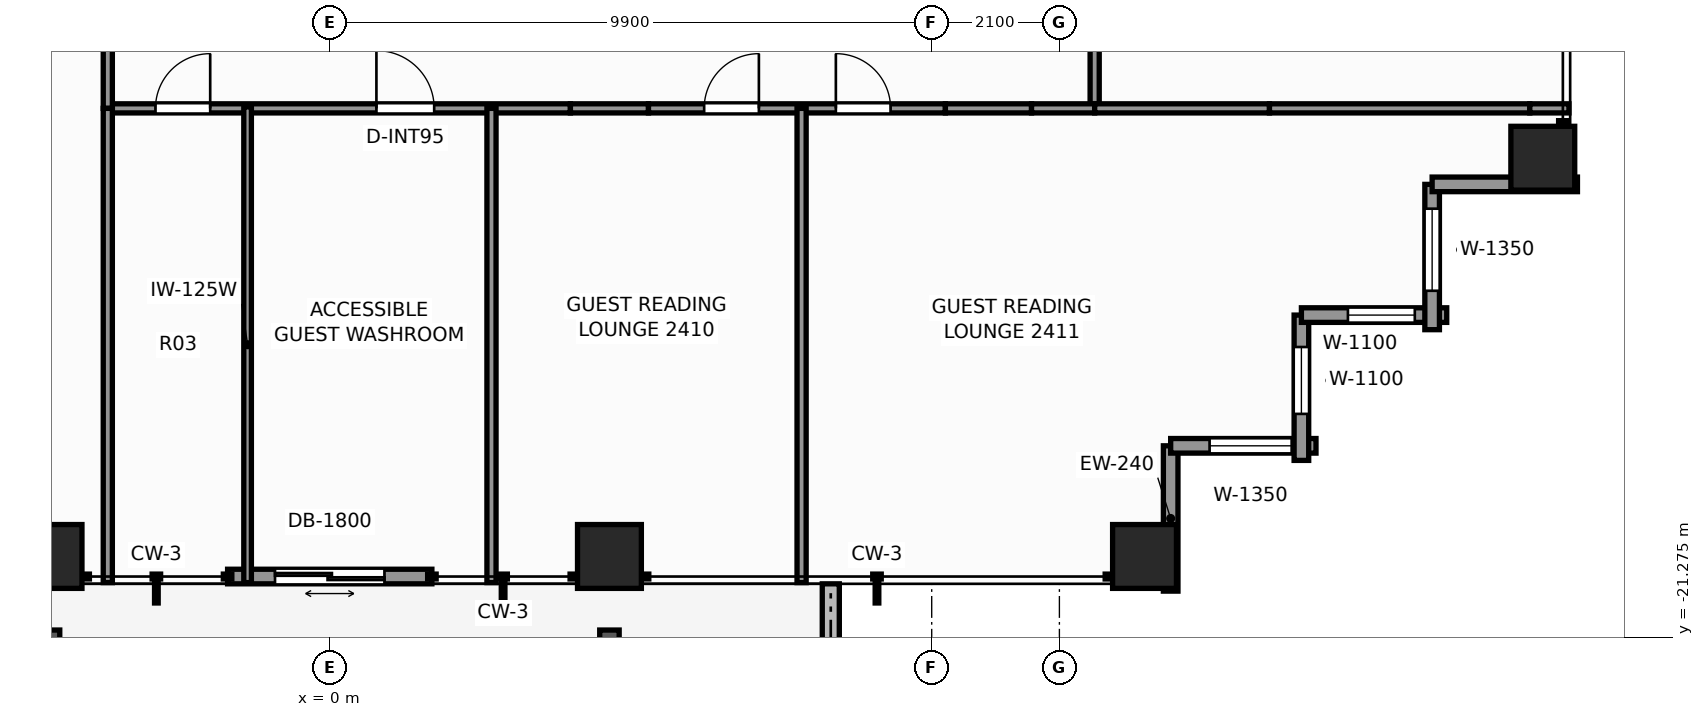
"""IFC4 building model, lengths in metres.
Left out: names, types, materials, properties, quantities, classifications, styles, units other than length and angle.
Written with IfcOpenShell. Run it as: python <this file> out.ifc"""

import sys

from ifc_helpers import new_model, si_unit, direction, frame, frame_2d, origin, origin_2d, place, context, subcontext, project, spatial, rectangle, extrude, element, fill, save


model = new_model("IFC4")
c1 = context("Model", 3, precision=1e-05, world=origin(), true_north=direction((0.0, 1.0)))
c2 = subcontext(c1, "Body", "Model", "MODEL_VIEW")
j1 = project(units=[si_unit("LENGTHUNIT", "METRE"), si_unit("PLANEANGLEUNIT", "RADIAN")], contexts=[c1])
p1 = place(None, origin())
s1 = spatial("IfcSite", under=j1, at=p1, CompositionType="ELEMENT")
p2 = place(p1, origin())
s2 = spatial("IfcBuilding", under=s1, at=p2, CompositionType="ELEMENT")
p3 = place(p2, frame((0.0, 0.0, 85.4)))
s3 = spatial("IfcBuildingStorey", under=s2, at=p3, CompositionType="ELEMENT", Elevation=85.4)
for number, where, z_axis, x_axis in (
    (1, (-4.6, -19.95, 0.0), (0.0, 0.0, 1.0), (1.0, 0.0, 0.0)),
    (2, (4.6, -19.95, 0.0), (0.0, 0.0, 1.0), (1.0, 0.0, 0.0)),
    (3, (13.4, -19.95, 0.0), (0.0, 0.0, 1.0), (1.0, 0.0, 0.0)),
    (4, (19.95, -13.4, 0.0), (0.0, 0.0, 1.0), (1.0, 0.0, 0.0)),
):
    element("IfcColumn", number, at=place(p3, frame(where, z_axis=z_axis, x_axis=x_axis)), inside=s3, PredefinedType="COLUMN", context=c2, shape_type="SweptSolid", body=[
        extrude(rectangle(XDim=1.05, YDim=1.05, at=origin_2d()), origin(), (0.0, 0.0, 1.0), 3.3),
    ])
p4 = place(p3, frame((8.24, -21.866, -0.04), z_axis=(0.0, 0.0, 1.0), x_axis=(0.0, 1.0, 0.0)))
e5 = element("IfcWall", 5, at=p4, inside=s3, PredefinedType="PARAPET", context=c2, shape_type="SweptSolid", body=[
    extrude(rectangle(XDim=1.466, YDim=0.28, at=frame_2d((0.733, 0.0))), origin(), (0.0, 0.0, 1.0), 0.42),
])
p5 = place(p3, frame((1.68, -20.28, 0.0), z_axis=(0.0, 0.0, 1.0), x_axis=(-1.0, 0.0, 0.0)))
e6 = element("IfcWall", 6, at=p5, inside=s3, PredefinedType="STANDARD", context=c2, shape_type="SweptSolid", body=[
    extrude(rectangle(XDim=3.36, YDim=0.24, at=frame_2d((1.68, 0.0))), origin(), (0.0, 0.0, 1.0), 3.08),
])
p6 = place(p5, frame((0.78, 0.0, 0.0)))
e7 = element("IfcOpeningElement", 7, at=p6, cuts=e6, PredefinedType="OPENING", context=c2, shape_type="SweptSolid", body=[
    extrude(rectangle(XDim=1.8, YDim=2.2, at=frame_2d((0.9, 1.1))), frame((0.0, 0.13, 0.0), z_axis=(0.0, -1.0, 0.0), x_axis=(1.0, 0.0, 0.0)), (0.0, 0.0, 1.0), 0.26),
])
p7 = place(p3, frame((13.83, -18.13, 0.0), z_axis=(0.0, 0.0, 1.0), x_axis=(0.0, -1.0, 0.0)))
e8 = element("IfcWall", 8, at=p7, inside=s3, PredefinedType="STANDARD", context=c2, shape_type="SweptSolid", body=[
    extrude(rectangle(XDim=2.39, YDim=0.24, at=frame_2d((1.195, 0.0))), origin(), (0.0, 0.0, 1.0), 1.275),
])
p8 = place(p3, frame((16.22, -18.13, 0.0), z_axis=(0.0, 0.0, 1.0), x_axis=(-1.0, 0.0, 0.0)))
e9 = element("IfcWall", 9, at=p8, inside=s3, PredefinedType="STANDARD", context=c2, shape_type="SweptSolid", body=[
    extrude(rectangle(XDim=2.39, YDim=0.24, at=frame_2d((1.195, 0.0))), origin(), (0.0, 0.0, 1.0), 2.459),
])
p9 = place(p8, frame((0.4, 0.0, 0.65)))
e10 = element("IfcOpeningElement", 10, at=p9, cuts=e9, PredefinedType="OPENING", context=c2, shape_type="SweptSolid", body=[
    extrude(rectangle(XDim=1.35, YDim=1.55, at=frame_2d((0.675, 0.775))), frame((0.0, 0.13, 0.0), z_axis=(0.0, -1.0, 0.0), x_axis=(1.0, 0.0, 0.0)), (0.0, 0.0, 1.0), 0.26),
])
p10 = place(p3, frame((15.98, -15.98, 0.0), z_axis=(0.0, 0.0, 1.0), x_axis=(0.0, -1.0, 0.0)))
e11 = element("IfcWall", 11, at=p10, inside=s3, PredefinedType="STANDARD", context=c2, shape_type="SweptSolid", body=[
    extrude(rectangle(XDim=2.39, YDim=0.24, at=frame_2d((1.195, 0.0))), origin(), (0.0, 0.0, 1.0), 2.459),
])
p11 = place(p10, frame((0.525, 0.0, 0.65)))
e12 = element("IfcOpeningElement", 12, at=p11, cuts=e11, PredefinedType="OPENING", context=c2, shape_type="SweptSolid", body=[
    extrude(rectangle(XDim=1.1, YDim=1.45, at=frame_2d((0.55, 0.725))), frame((0.0, 0.13, 0.0), z_axis=(0.0, -1.0, 0.0), x_axis=(1.0, 0.0, 0.0)), (0.0, 0.0, 1.0), 0.26),
])
p12 = place(p3, frame((18.37, -15.98, 0.0), z_axis=(0.0, 0.0, 1.0), x_axis=(-1.0, 0.0, 0.0)))
e13 = element("IfcWall", 13, at=p12, inside=s3, PredefinedType="STANDARD", context=c2, shape_type="SweptSolid", body=[
    extrude(rectangle(XDim=2.39, YDim=0.24, at=frame_2d((1.195, 0.0))), origin(), (0.0, 0.0, 1.0), 2.459),
])
p13 = place(p12, frame((0.525, 0.0, 0.65)))
e14 = element("IfcOpeningElement", 14, at=p13, cuts=e13, PredefinedType="OPENING", context=c2, shape_type="SweptSolid", body=[
    extrude(rectangle(XDim=1.1, YDim=1.45, at=frame_2d((0.55, 0.725))), frame((0.0, 0.13, 0.0), z_axis=(0.0, -1.0, 0.0), x_axis=(1.0, 0.0, 0.0)), (0.0, 0.0, 1.0), 0.26),
])
p14 = place(p3, frame((18.13, -13.83, 0.0), z_axis=(0.0, 0.0, 1.0), x_axis=(0.0, -1.0, 0.0)))
e15 = element("IfcWall", 15, at=p14, inside=s3, PredefinedType="STANDARD", context=c2, shape_type="SweptSolid", body=[
    extrude(rectangle(XDim=2.39, YDim=0.24, at=frame_2d((1.195, 0.0))), origin(), (0.0, 0.0, 1.0), 2.459),
])
p15 = place(p14, frame((0.4, 0.0, 0.65)))
e16 = element("IfcOpeningElement", 16, at=p15, cuts=e15, PredefinedType="OPENING", context=c2, shape_type="SweptSolid", body=[
    extrude(rectangle(XDim=1.35, YDim=1.55, at=frame_2d((0.675, 0.775))), frame((0.0, 0.13, 0.0), z_axis=(0.0, -1.0, 0.0), x_axis=(1.0, 0.0, 0.0)), (0.0, 0.0, 1.0), 0.26),
])
p16 = place(p3, frame((20.52, -13.83, 0.0), z_axis=(0.0, 0.0, 1.0), x_axis=(-1.0, 0.0, 0.0)))
e17 = element("IfcWall", 17, at=p16, inside=s3, PredefinedType="STANDARD", context=c2, shape_type="SweptSolid", body=[
    extrude(rectangle(XDim=2.39, YDim=0.24, at=frame_2d((1.195, 0.0))), origin(), (0.0, 0.0, 1.0), 1.275),
])
p17 = place(p3, frame((12.58, -12.58, 0.0), z_axis=(0.0, 0.0, 1.0), x_axis=(0.0, 1.0, 0.0)))
e18 = element("IfcWall", 18, at=p17, inside=s3, PredefinedType="PARTITIONING", context=c2, shape_type="SweptSolid", body=[
    extrude(rectangle(XDim=1.038, YDim=0.15, at=frame_2d((0.519, 0.0))), origin(), (0.0, 0.0, 1.0), 3.08),
])
p18 = place(p3, frame((-3.65, -12.58, 0.0), z_axis=(0.0, 0.0, 1.0), x_axis=(1.0, 0.0, 0.0)))
e19 = element("IfcWall", 19, at=p18, inside=s3, PredefinedType="PARTITIONING", context=c2, shape_type="SweptSolid", body=[
    extrude(rectangle(XDim=7.608, YDim=0.15, at=frame_2d((3.804, 0.0))), origin(), (0.0, 0.0, 1.0), 2.605),
])
p19 = place(p18, frame((0.784, 0.0, 0.0)))
e20 = element("IfcOpeningElement", 20, at=p19, cuts=e19, PredefinedType="OPENING", context=c2, shape_type="SweptSolid", body=[
    extrude(rectangle(XDim=0.9, YDim=2.06, at=frame_2d((0.45, 1.03))), frame((0.0, 0.085, 0.0), z_axis=(0.0, -1.0, 0.0), x_axis=(1.0, 0.0, 0.0)), (0.0, 0.0, 1.0), 0.17),
])
p20 = place(p18, frame((4.418, 0.0, 0.0)))
e21 = element("IfcOpeningElement", 21, at=p20, cuts=e19, PredefinedType="OPENING", context=c2, shape_type="SweptSolid", body=[
    extrude(rectangle(XDim=0.95, YDim=2.06, at=frame_2d((0.475, 1.03))), frame((0.0, 0.085, 0.0), z_axis=(0.0, -1.0, 0.0), x_axis=(1.0, 0.0, 0.0)), (0.0, 0.0, 1.0), 0.17),
])
p21 = place(p3, frame((3.958, -12.58, 0.0), z_axis=(0.0, 0.0, 1.0), x_axis=(1.0, 0.0, 0.0)))
e22 = element("IfcWall", 22, at=p21, inside=s3, PredefinedType="PARTITIONING", context=c2, shape_type="SweptSolid", body=[
    extrude(rectangle(XDim=1.284, YDim=0.15, at=frame_2d((0.642, 0.0))), origin(), (0.0, 0.0, 1.0), 1.265),
])
p22 = place(p3, frame((5.242, -12.58, 0.0), z_axis=(0.0, 0.0, 1.0), x_axis=(1.0, 0.0, 0.0)))
e23 = element("IfcWall", 23, at=p22, inside=s3, PredefinedType="PARTITIONING", context=c2, shape_type="SweptSolid", body=[
    extrude(rectangle(XDim=4.883, YDim=0.15, at=frame_2d((2.441, 0.0))), origin(), (0.0, 0.0, 1.0), 3.08),
])
p23 = place(p22, frame((0.916, 0.0, 0.0)))
e24 = element("IfcOpeningElement", 24, at=p23, cuts=e23, PredefinedType="OPENING", context=c2, shape_type="SweptSolid", body=[
    extrude(rectangle(XDim=0.9, YDim=2.06, at=frame_2d((0.45, 1.03))), frame((0.0, 0.085, 0.0), z_axis=(0.0, -1.0, 0.0), x_axis=(1.0, 0.0, 0.0)), (0.0, 0.0, 1.0), 0.17),
])
p24 = place(p22, frame((3.082, 0.0, 0.0)))
e25 = element("IfcOpeningElement", 25, at=p24, cuts=e23, PredefinedType="OPENING", context=c2, shape_type="SweptSolid", body=[
    extrude(rectangle(XDim=0.9, YDim=2.06, at=frame_2d((0.45, 1.03))), frame((0.0, 0.085, 0.0), z_axis=(0.0, -1.0, 0.0), x_axis=(1.0, 0.0, 0.0)), (0.0, 0.0, 1.0), 0.17),
])
p25 = place(p3, frame((10.125, -12.58, 0.0), z_axis=(0.0, 0.0, 1.0), x_axis=(1.0, 0.0, 0.0)))
e26 = element("IfcWall", 26, at=p25, inside=s3, PredefinedType="PARTITIONING", context=c2, shape_type="SweptSolid", body=[
    extrude(rectangle(XDim=1.417, YDim=0.15, at=frame_2d((0.708, 0.0))), origin(), (0.0, 0.0, 1.0), 1.265),
])
p26 = place(p3, frame((11.542, -12.58, 0.0), z_axis=(0.0, 0.0, 1.0), x_axis=(1.0, 0.0, 0.0)))
e27 = element("IfcWall", 27, at=p26, inside=s3, PredefinedType="PARTITIONING", context=c2, shape_type="SweptSolid", body=[
    extrude(rectangle(XDim=1.038, YDim=0.15, at=frame_2d((0.519, 0.0))), origin(), (0.0, 0.0, 1.0), 3.08),
])
p27 = place(p3, frame((-3.65, -12.58, 0.0), z_axis=(0.0, 0.0, 1.0), x_axis=(0.0, 1.0, 0.0)))
e28 = element("IfcWall", 28, at=p27, inside=s3, PredefinedType="PARTITIONING", context=c2, shape_type="SweptSolid", body=[
    extrude(rectangle(XDim=2.68, YDim=0.15, at=frame_2d((1.34, 0.0))), origin(), (0.0, 0.0, 1.0), 3.08),
])
p28 = place(p3, frame((12.58, -12.58, 0.0), z_axis=(0.0, 0.0, 1.0), x_axis=(1.0, 0.0, 0.0)))
e29 = element("IfcWall", 29, at=p28, inside=s3, PredefinedType="PARTITIONING", context=c2, shape_type="SweptSolid", body=[
    extrude(rectangle(XDim=2.875, YDim=0.15, at=frame_2d((1.438, 0.0))), origin(), (0.0, 0.0, 1.0), 3.08),
])
p29 = place(p3, frame((15.455, -12.58, 0.0), z_axis=(0.0, 0.0, 1.0), x_axis=(1.0, 0.0, 0.0)))
e30 = element("IfcWall", 30, at=p29, inside=s3, PredefinedType="PARTITIONING", context=c2, shape_type="SweptSolid", body=[
    extrude(rectangle(XDim=4.281, YDim=0.15, at=frame_2d((2.141, 0.0))), origin(), (0.0, 0.0, 1.0), 1.265),
])
p30 = place(p3, frame((19.736, -12.58, 0.0), z_axis=(0.0, 0.0, 1.0), x_axis=(1.0, 0.0, 0.0)))
e31 = element("IfcWall", 31, at=p30, inside=s3, PredefinedType="PARTITIONING", context=c2, shape_type="SweptSolid", body=[
    extrude(rectangle(XDim=0.644, YDim=0.15, at=frame_2d((0.322, 0.0))), origin(), (0.0, 0.0, 1.0), 2.449),
])
for number, where, z_axis, x_axis in (
    (32, (-3.65, -20.38, 0.0), (0.0, 0.0, 1.0), (0.0, 1.0, 0.0)),
    (33, (2.66, -20.38, 0.0), (0.0, 0.0, 1.0), (0.0, 1.0, 0.0)),
):
    element("IfcWall", number, at=place(p3, frame(where, z_axis=z_axis, x_axis=x_axis)), inside=s3, PredefinedType="PARTITIONING", context=c2, shape_type="SweptSolid", body=[
        extrude(rectangle(XDim=7.8, YDim=0.15, at=frame_2d((3.9, 0.0))), origin(), (0.0, 0.0, 1.0), 2.449),
    ])
p31 = place(p3, frame((-1.351, -20.38, 0.0), z_axis=(0.0, 0.0, 1.0), x_axis=(0.0, 1.0, 0.0)))
e34 = element("IfcWall", 34, at=p31, inside=s3, PredefinedType="PARTITIONING", context=c2, shape_type="SweptSolid", body=[
    extrude(rectangle(XDim=7.825, YDim=0.125, at=frame_2d((3.913, 0.0))), origin(), (0.0, 0.0, 1.0), 2.449),
])
p32 = place(p3, frame((7.76, -20.38, 0.0), z_axis=(0.0, 0.0, 1.0), x_axis=(0.0, 1.0, 0.0)))
e35 = element("IfcWall", 35, at=p32, inside=s3, PredefinedType="PARTITIONING", context=c2, shape_type="SweptSolid", body=[
    extrude(rectangle(XDim=7.8, YDim=0.15, at=frame_2d((3.9, 0.0))), origin(), (0.0, 0.0, 1.0), 2.449),
])
p33 = place(p6, origin())
e36 = element("IfcDoor", 36, at=p33, inside=s3, OperationType="DOUBLE_DOOR_SLIDING", PredefinedType="DOOR", context=c2, shape_type="SweptSolid", body=[
    extrude(rectangle(XDim=1.8, YDim=2.2, at=frame_2d((0.9, 1.1))), frame((0.0, 0.025, 0.0), z_axis=(0.0, -1.0, 0.0), x_axis=(1.0, 0.0, 0.0)), (0.0, 0.0, 1.0), 0.05),
])
fill(e7, e36)
p34 = place(p9, origin())
e37 = element("IfcWindow", 37, at=p34, inside=s3, PartitioningType="SINGLE_PANEL", PredefinedType="WINDOW", context=c2, shape_type="SweptSolid", body=[
    extrude(rectangle(XDim=1.35, YDim=1.55, at=frame_2d((0.675, 0.775))), frame((0.0, 0.03, 0.0), z_axis=(0.0, -1.0, 0.0), x_axis=(1.0, 0.0, 0.0)), (0.0, 0.0, 1.0), 0.06),
])
fill(e10, e37)
p35 = place(p11, origin())
e38 = element("IfcWindow", 38, at=p35, inside=s3, PartitioningType="SINGLE_PANEL", PredefinedType="WINDOW", context=c2, shape_type="SweptSolid", body=[
    extrude(rectangle(XDim=1.1, YDim=1.45, at=frame_2d((0.55, 0.725))), frame((0.0, 0.03, 0.0), z_axis=(0.0, -1.0, 0.0), x_axis=(1.0, 0.0, 0.0)), (0.0, 0.0, 1.0), 0.06),
])
fill(e12, e38)
p36 = place(p13, origin())
e39 = element("IfcWindow", 39, at=p36, inside=s3, PartitioningType="SINGLE_PANEL", PredefinedType="WINDOW", context=c2, shape_type="SweptSolid", body=[
    extrude(rectangle(XDim=1.1, YDim=1.45, at=frame_2d((0.55, 0.725))), frame((0.0, 0.03, 0.0), z_axis=(0.0, -1.0, 0.0), x_axis=(1.0, 0.0, 0.0)), (0.0, 0.0, 1.0), 0.06),
])
fill(e14, e39)
p37 = place(p15, origin())
e40 = element("IfcWindow", 40, at=p37, inside=s3, PartitioningType="SINGLE_PANEL", PredefinedType="WINDOW", context=c2, shape_type="SweptSolid", body=[
    extrude(rectangle(XDim=1.35, YDim=1.55, at=frame_2d((0.675, 0.775))), frame((0.0, 0.03, 0.0), z_axis=(0.0, -1.0, 0.0), x_axis=(1.0, 0.0, 0.0)), (0.0, 0.0, 1.0), 0.06),
])
fill(e16, e40)
p38 = place(p19, origin())
e41 = element("IfcDoor", 41, at=p38, inside=s3, OperationType="SINGLE_SWING_RIGHT", PredefinedType="DOOR", context=c2, shape_type="SweptSolid", body=[
    extrude(rectangle(XDim=0.9, YDim=2.06, at=frame_2d((0.45, 1.03))), frame((0.0, 0.025, 0.0), z_axis=(0.0, -1.0, 0.0), x_axis=(1.0, 0.0, 0.0)), (0.0, 0.0, 1.0), 0.05),
])
fill(e20, e41)
p39 = place(p20, origin())
e42 = element("IfcDoor", 42, at=p39, inside=s3, OperationType="SINGLE_SWING_LEFT", PredefinedType="DOOR", context=c2, shape_type="SweptSolid", body=[
    extrude(rectangle(XDim=0.95, YDim=2.06, at=frame_2d((0.475, 1.03))), frame((0.0, 0.025, 0.0), z_axis=(0.0, -1.0, 0.0), x_axis=(1.0, 0.0, 0.0)), (0.0, 0.0, 1.0), 0.05),
])
fill(e21, e42)
p40 = place(p23, origin())
e43 = element("IfcDoor", 43, at=p40, inside=s3, OperationType="SINGLE_SWING_RIGHT", PredefinedType="DOOR", context=c2, shape_type="SweptSolid", body=[
    extrude(rectangle(XDim=0.9, YDim=2.06, at=frame_2d((0.45, 1.03))), frame((0.0, 0.025, 0.0), z_axis=(0.0, -1.0, 0.0), x_axis=(1.0, 0.0, 0.0)), (0.0, 0.0, 1.0), 0.05),
])
fill(e24, e43)
p41 = place(p24, origin())
e44 = element("IfcDoor", 44, at=p41, inside=s3, OperationType="SINGLE_SWING_LEFT", PredefinedType="DOOR", context=c2, shape_type="SweptSolid", body=[
    extrude(rectangle(XDim=0.9, YDim=2.06, at=frame_2d((0.45, 1.03))), frame((0.0, 0.025, 0.0), z_axis=(0.0, -1.0, 0.0), x_axis=(1.0, 0.0, 0.0)), (0.0, 0.0, 1.0), 0.05),
])
fill(e25, e44)
save(model, sys.argv[1])
